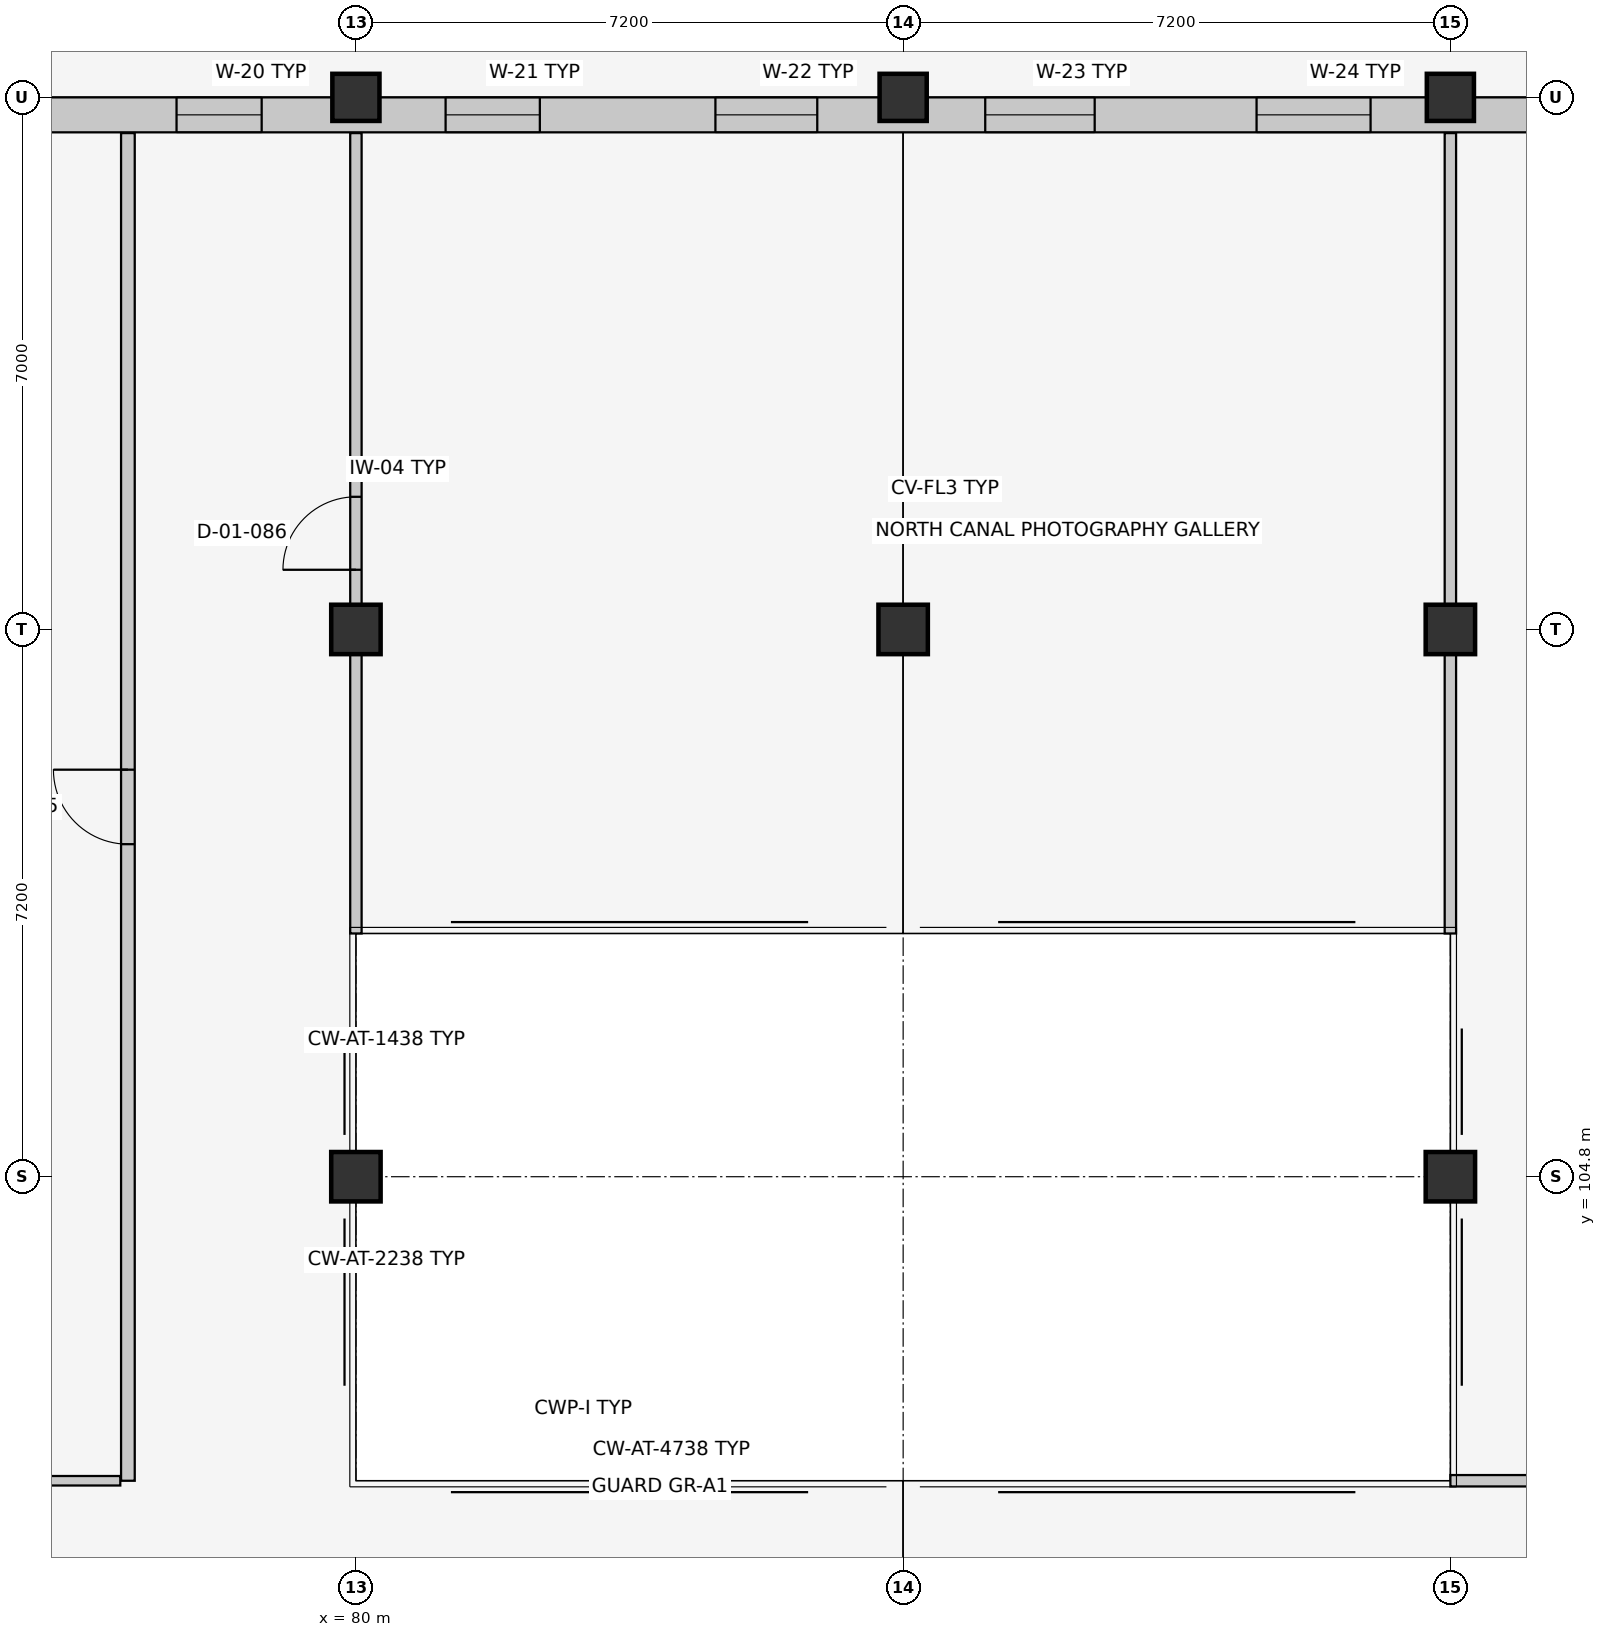
"""IFC4 building model, lengths in metres.
Left out: names, types, materials, properties, quantities, classifications, styles, units other than length and angle.
Written with IfcOpenShell. Run it as: python <this file> out.ifc"""

import sys

from ifc_helpers import new_model, si_unit, direction, frame, frame_2d, origin, origin_2d, place, context, subcontext, project, spatial, rectangle, extrude, element, fill, save


model = new_model("IFC4")
c1 = context("Model", 3, precision=1e-05, world=origin(), true_north=direction((0.0, 1.0)))
c2 = subcontext(c1, "Body", "Model", "MODEL_VIEW")
j1 = project(units=[si_unit("LENGTHUNIT", "METRE"), si_unit("PLANEANGLEUNIT", "RADIAN")], contexts=[c1])
p1 = place(None, origin())
s1 = spatial("IfcSite", under=j1, at=p1, CompositionType="ELEMENT")
p2 = place(p1, origin())
s2 = spatial("IfcBuilding", under=s1, at=p2, CompositionType="ELEMENT")
p3 = place(p2, frame((0.0, 0.0, 5.4)))
s3 = spatial("IfcBuildingStorey", under=s2, at=p3, CompositionType="ELEMENT", Elevation=5.4)
for number, where, z_axis, x_axis in (
    (1, (80.0, 104.8, 0.0), (0.0, 0.0, 1.0), (1.0, 0.0, 0.0)),
    (2, (80.0, 112.0, 0.0), (0.0, 0.0, 1.0), (1.0, 0.0, 0.0)),
):
    element("IfcColumn", number, at=place(p3, frame(where, z_axis=z_axis, x_axis=x_axis)), inside=s3, PredefinedType="COLUMN", context=c2, shape_type="SweptSolid", body=[
        extrude(rectangle(XDim=0.65, YDim=0.65, at=origin_2d()), origin(), (0.0, 0.0, 1.0), 4.2),
    ])
p4 = place(p3, frame((80.0, 119.0, 0.0), z_axis=(0.0, 0.0, 1.0), x_axis=(1.0, 0.0, 0.0)))
e3 = element("IfcColumn", 3, at=p4, inside=s3, PredefinedType="COLUMN", context=c2, shape_type="SweptSolid", body=[
    extrude(rectangle(XDim=0.62, YDim=0.62, at=origin_2d()), origin(), (0.0, 0.0, 1.0), 4.2),
])
p5 = place(p3, frame((87.2, 112.0, 0.0), z_axis=(0.0, 0.0, 1.0), x_axis=(1.0, 0.0, 0.0)))
e4 = element("IfcColumn", 4, at=p5, inside=s3, PredefinedType="COLUMN", context=c2, shape_type="SweptSolid", body=[
    extrude(rectangle(XDim=0.65, YDim=0.65, at=origin_2d()), origin(), (0.0, 0.0, 1.0), 4.2),
])
p6 = place(p3, frame((87.2, 119.0, 0.0), z_axis=(0.0, 0.0, 1.0), x_axis=(1.0, 0.0, 0.0)))
e5 = element("IfcColumn", 5, at=p6, inside=s3, PredefinedType="COLUMN", context=c2, shape_type="SweptSolid", body=[
    extrude(rectangle(XDim=0.62, YDim=0.62, at=origin_2d()), origin(), (0.0, 0.0, 1.0), 4.2),
])
for number, where, z_axis, x_axis in (
    (6, (94.4, 104.8, 0.0), (0.0, 0.0, 1.0), (1.0, 0.0, 0.0)),
    (7, (94.4, 112.0, 0.0), (0.0, 0.0, 1.0), (1.0, 0.0, 0.0)),
):
    element("IfcColumn", number, at=place(p3, frame(where, z_axis=z_axis, x_axis=x_axis)), inside=s3, PredefinedType="COLUMN", context=c2, shape_type="SweptSolid", body=[
        extrude(rectangle(XDim=0.65, YDim=0.65, at=origin_2d()), origin(), (0.0, 0.0, 1.0), 4.2),
    ])
p7 = place(p3, frame((94.4, 119.0, 0.0), z_axis=(0.0, 0.0, 1.0), x_axis=(1.0, 0.0, 0.0)))
e8 = element("IfcColumn", 8, at=p7, inside=s3, PredefinedType="COLUMN", context=c2, shape_type="SweptSolid", body=[
    extrude(rectangle(XDim=0.62, YDim=0.62, at=origin_2d()), origin(), (0.0, 0.0, 1.0), 4.2),
])
p8 = place(p3, frame((65.6, 118.77, 0.0), z_axis=(0.0, 0.0, 1.0), x_axis=(1.0, 0.0, 0.0)))
e9 = element("IfcWall", 9, at=p8, inside=s3, PredefinedType="SOLIDWALL", context=c2, shape_type="SweptSolid", body=[
    extrude(rectangle(XDim=43.2, YDim=0.46, at=frame_2d((21.6, 0.0))), origin(), (0.0, 0.0, 1.0), 3.215),
])
p9 = place(p8, frame((1.11, 0.0, 0.9)))
e10 = element("IfcOpeningElement", 10, at=p9, cuts=e9, PredefinedType="OPENING", context=c2, shape_type="SweptSolid", body=[
    extrude(rectangle(XDim=1.38, YDim=1.6, at=frame_2d((0.69, 0.8))), frame((0.0, 0.242, 0.0), z_axis=(0.0, -1.0, 0.0), x_axis=(1.0, 0.0, 0.0)), (0.0, 0.0, 1.0), 0.484),
])
p10 = place(p8, frame((4.65, 0.0, 0.9)))
e11 = element("IfcOpeningElement", 11, at=p10, cuts=e9, PredefinedType="OPENING", context=c2, shape_type="SweptSolid", body=[
    extrude(rectangle(XDim=1.5, YDim=1.6, at=frame_2d((0.75, 0.8))), frame((0.0, 0.242, 0.0), z_axis=(0.0, -1.0, 0.0), x_axis=(1.0, 0.0, 0.0)), (0.0, 0.0, 1.0), 0.484),
])
p11 = place(p8, frame((8.5, 0.0, 0.9)))
e12 = element("IfcOpeningElement", 12, at=p11, cuts=e9, PredefinedType="OPENING", context=c2, shape_type="SweptSolid", body=[
    extrude(rectangle(XDim=1.0, YDim=1.75, at=frame_2d((0.5, 0.875))), frame((0.0, 0.242, 0.0), z_axis=(0.0, -1.0, 0.0), x_axis=(1.0, 0.0, 0.0)), (0.0, 0.0, 1.0), 0.484),
])
p12 = place(p8, frame((12.04, 0.0, 0.9)))
e13 = element("IfcOpeningElement", 13, at=p12, cuts=e9, PredefinedType="OPENING", context=c2, shape_type="SweptSolid", body=[
    extrude(rectangle(XDim=1.12, YDim=1.75, at=frame_2d((0.56, 0.875))), frame((0.0, 0.242, 0.0), z_axis=(0.0, -1.0, 0.0), x_axis=(1.0, 0.0, 0.0)), (0.0, 0.0, 1.0), 0.484),
])
p13 = place(p8, frame((15.58, 0.0, 0.9)))
e14 = element("IfcOpeningElement", 14, at=p13, cuts=e9, PredefinedType="OPENING", context=c2, shape_type="SweptSolid", body=[
    extrude(rectangle(XDim=1.24, YDim=1.75, at=frame_2d((0.62, 0.875))), frame((0.0, 0.242, 0.0), z_axis=(0.0, -1.0, 0.0), x_axis=(1.0, 0.0, 0.0)), (0.0, 0.0, 1.0), 0.484),
])
p14 = place(p8, frame((19.13, 0.0, 0.9)))
e15 = element("IfcOpeningElement", 15, at=p14, cuts=e9, PredefinedType="OPENING", context=c2, shape_type="SweptSolid", body=[
    extrude(rectangle(XDim=1.34, YDim=1.75, at=frame_2d((0.67, 0.875))), frame((0.0, 0.242, 0.0), z_axis=(0.0, -1.0, 0.0), x_axis=(1.0, 0.0, 0.0)), (0.0, 0.0, 1.0), 0.484),
])
p15 = place(p8, frame((22.68, 0.0, 0.9)))
e16 = element("IfcOpeningElement", 16, at=p15, cuts=e9, PredefinedType="OPENING", context=c2, shape_type="SweptSolid", body=[
    extrude(rectangle(XDim=1.44, YDim=1.75, at=frame_2d((0.72, 0.875))), frame((0.0, 0.242, 0.0), z_axis=(0.0, -1.0, 0.0), x_axis=(1.0, 0.0, 0.0)), (0.0, 0.0, 1.0), 0.484),
])
p16 = place(p8, frame((26.25, 0.0, 0.9)))
e17 = element("IfcOpeningElement", 17, at=p16, cuts=e9, PredefinedType="OPENING", context=c2, shape_type="SweptSolid", body=[
    extrude(rectangle(XDim=1.5, YDim=1.75, at=frame_2d((0.75, 0.875))), frame((0.0, 0.242, 0.0), z_axis=(0.0, -1.0, 0.0), x_axis=(1.0, 0.0, 0.0)), (0.0, 0.0, 1.0), 0.484),
])
p17 = place(p8, frame((30.15, 0.0, 0.9)))
e18 = element("IfcOpeningElement", 18, at=p17, cuts=e9, PredefinedType="OPENING", context=c2, shape_type="SweptSolid", body=[
    extrude(rectangle(XDim=0.9, YDim=1.35, at=frame_2d((0.45, 0.675))), frame((0.0, 0.242, 0.0), z_axis=(0.0, -1.0, 0.0), x_axis=(1.0, 0.0, 0.0)), (0.0, 0.0, 1.0), 0.484),
])
p18 = place(p8, frame((33.7, 0.0, 0.9)))
e19 = element("IfcOpeningElement", 19, at=p18, cuts=e9, PredefinedType="OPENING", context=c2, shape_type="SweptSolid", body=[
    extrude(rectangle(XDim=1.0, YDim=1.35, at=frame_2d((0.5, 0.675))), frame((0.0, 0.242, 0.0), z_axis=(0.0, -1.0, 0.0), x_axis=(1.0, 0.0, 0.0)), (0.0, 0.0, 1.0), 0.484),
])
p19 = place(p8, frame((37.25, 0.0, 0.9)))
e20 = element("IfcOpeningElement", 20, at=p19, cuts=e9, PredefinedType="OPENING", context=c2, shape_type="SweptSolid", body=[
    extrude(rectangle(XDim=1.1, YDim=1.35, at=frame_2d((0.55, 0.675))), frame((0.0, 0.242, 0.0), z_axis=(0.0, -1.0, 0.0), x_axis=(1.0, 0.0, 0.0)), (0.0, 0.0, 1.0), 0.484),
])
p20 = place(p8, frame((40.8, 0.0, 0.9)))
e21 = element("IfcOpeningElement", 21, at=p20, cuts=e9, PredefinedType="OPENING", context=c2, shape_type="SweptSolid", body=[
    extrude(rectangle(XDim=1.2, YDim=1.35, at=frame_2d((0.6, 0.675))), frame((0.0, 0.242, 0.0), z_axis=(0.0, -1.0, 0.0), x_axis=(1.0, 0.0, 0.0)), (0.0, 0.0, 1.0), 0.484),
])
p21 = place(p3, frame((77.0, 100.8, 0.0), z_axis=(0.0, 0.0, 1.0), x_axis=(0.0, 1.0, 0.0)))
e22 = element("IfcWall", 22, at=p21, inside=s3, PredefinedType="PARTITIONING", context=c2, shape_type="SweptSolid", body=[
    extrude(rectangle(XDim=17.73, YDim=0.18, at=frame_2d((8.865, 0.0))), origin(), (0.0, 0.0, 1.0), 3.92),
])
p22 = place(p21, frame((8.375, 0.0, 0.0)))
e23 = element("IfcOpeningElement", 23, at=p22, cuts=e22, PredefinedType="OPENING", context=c2, shape_type="SweptSolid", body=[
    extrude(rectangle(XDim=0.98, YDim=2.12, at=frame_2d((0.49, 1.06))), frame((0.0, 0.102, 0.0), z_axis=(0.0, -1.0, 0.0), x_axis=(1.0, 0.0, 0.0)), (0.0, 0.0, 1.0), 0.204),
])
p23 = place(p3, frame((66.07, 100.8, 0.0), z_axis=(0.0, 0.0, 1.0), x_axis=(1.0, 0.0, 0.0)))
e24 = element("IfcWall", 24, at=p23, inside=s3, PredefinedType="PARTITIONING", context=c2, shape_type="SweptSolid", body=[
    extrude(rectangle(XDim=10.83, YDim=0.125, at=frame_2d((5.415, 0.0))), origin(), (0.0, 0.0, 1.0), 3.92),
])
p24 = place(p3, frame((80.0, 108.0, 0.0), z_axis=(0.0, 0.0, 1.0), x_axis=(0.0, 1.0, 0.0)))
e25 = element("IfcWall", 25, at=p24, inside=s3, PredefinedType="PARTITIONING", context=c2, shape_type="SweptSolid", body=[
    extrude(rectangle(XDim=10.53, YDim=0.15, at=frame_2d((5.265, 0.0))), origin(), (0.0, 0.0, 1.0), 3.295),
])
p25 = place(p24, frame((4.785, 0.0, 0.0)))
e26 = element("IfcOpeningElement", 26, at=p25, cuts=e25, PredefinedType="OPENING", context=c2, shape_type="SweptSolid", body=[
    extrude(rectangle(XDim=0.96, YDim=2.1, at=frame_2d((0.48, 1.05))), frame((0.0, 0.087, 0.0), z_axis=(0.0, -1.0, 0.0), x_axis=(1.0, 0.0, 0.0)), (0.0, 0.0, 1.0), 0.174),
])
p26 = place(p3, frame((94.4, 108.0, 0.0), z_axis=(0.0, 0.0, 1.0), x_axis=(0.0, 1.0, 0.0)))
e27 = element("IfcWall", 27, at=p26, inside=s3, PredefinedType="PARTITIONING", context=c2, shape_type="SweptSolid", body=[
    extrude(rectangle(XDim=10.53, YDim=0.15, at=frame_2d((5.265, 0.0))), origin(), (0.0, 0.0, 1.0), 3.295),
])
p27 = place(p3, frame((94.4, 100.8, 0.0), z_axis=(0.0, 0.0, 1.0), x_axis=(1.0, 0.0, 0.0)))
e28 = element("IfcWall", 28, at=p27, inside=s3, PredefinedType="PARTITIONING", context=c2, shape_type="SweptSolid", body=[
    extrude(rectangle(XDim=13.93, YDim=0.15, at=frame_2d((6.965, 0.0))), origin(), (0.0, 0.0, 1.0), 3.92),
])
p28 = place(p27, frame((6.495, 0.0, 0.0)))
e29 = element("IfcOpeningElement", 29, at=p28, cuts=e28, PredefinedType="OPENING", context=c2, shape_type="SweptSolid", body=[
    extrude(rectangle(XDim=0.94, YDim=2.1, at=frame_2d((0.47, 1.05))), frame((0.0, 0.087, 0.0), z_axis=(0.0, -1.0, 0.0), x_axis=(1.0, 0.0, 0.0)), (0.0, 0.0, 1.0), 0.174),
])
p29 = place(p12, origin())
e30 = element("IfcWindow", 30, at=p29, inside=s3, PartitioningType="SINGLE_PANEL", PredefinedType="WINDOW", context=c2, shape_type="SweptSolid", body=[
    extrude(rectangle(XDim=1.12, YDim=1.75, at=frame_2d((0.56, 0.875))), frame((0.0, 0.03, 0.0), z_axis=(0.0, -1.0, 0.0), x_axis=(1.0, 0.0, 0.0)), (0.0, 0.0, 1.0), 0.06),
])
fill(e13, e30)
p30 = place(p13, origin())
e31 = element("IfcWindow", 31, at=p30, inside=s3, PartitioningType="SINGLE_PANEL", PredefinedType="WINDOW", context=c2, shape_type="SweptSolid", body=[
    extrude(rectangle(XDim=1.24, YDim=1.75, at=frame_2d((0.62, 0.875))), frame((0.0, 0.03, 0.0), z_axis=(0.0, -1.0, 0.0), x_axis=(1.0, 0.0, 0.0)), (0.0, 0.0, 1.0), 0.06),
])
fill(e14, e31)
p31 = place(p14, origin())
e32 = element("IfcWindow", 32, at=p31, inside=s3, PartitioningType="SINGLE_PANEL", PredefinedType="WINDOW", context=c2, shape_type="SweptSolid", body=[
    extrude(rectangle(XDim=1.34, YDim=1.75, at=frame_2d((0.67, 0.875))), frame((0.0, 0.03, 0.0), z_axis=(0.0, -1.0, 0.0), x_axis=(1.0, 0.0, 0.0)), (0.0, 0.0, 1.0), 0.06),
])
fill(e15, e32)
p32 = place(p15, origin())
e33 = element("IfcWindow", 33, at=p32, inside=s3, PartitioningType="SINGLE_PANEL", PredefinedType="WINDOW", context=c2, shape_type="SweptSolid", body=[
    extrude(rectangle(XDim=1.44, YDim=1.75, at=frame_2d((0.72, 0.875))), frame((0.0, 0.03, 0.0), z_axis=(0.0, -1.0, 0.0), x_axis=(1.0, 0.0, 0.0)), (0.0, 0.0, 1.0), 0.06),
])
fill(e16, e33)
p33 = place(p16, origin())
e34 = element("IfcWindow", 34, at=p33, inside=s3, PartitioningType="SINGLE_PANEL", PredefinedType="WINDOW", context=c2, shape_type="SweptSolid", body=[
    extrude(rectangle(XDim=1.5, YDim=1.75, at=frame_2d((0.75, 0.875))), frame((0.0, 0.03, 0.0), z_axis=(0.0, -1.0, 0.0), x_axis=(1.0, 0.0, 0.0)), (0.0, 0.0, 1.0), 0.06),
])
fill(e17, e34)
p34 = place(p22, origin())
e35 = element("IfcDoor", 35, at=p34, inside=s3, OperationType="SINGLE_SWING_RIGHT", PredefinedType="DOOR", context=c2, shape_type="SweptSolid", body=[
    extrude(rectangle(XDim=0.98, YDim=2.12, at=frame_2d((0.49, 1.06))), frame((0.0, 0.025, 0.0), z_axis=(0.0, -1.0, 0.0), x_axis=(1.0, 0.0, 0.0)), (0.0, 0.0, 1.0), 0.05),
])
fill(e23, e35)
p35 = place(p25, origin())
e36 = element("IfcDoor", 36, at=p35, inside=s3, OperationType="SINGLE_SWING_LEFT", PredefinedType="DOOR", context=c2, shape_type="SweptSolid", body=[
    extrude(rectangle(XDim=0.96, YDim=2.1, at=frame_2d((0.48, 1.05))), frame((0.0, 0.025, 0.0), z_axis=(0.0, -1.0, 0.0), x_axis=(1.0, 0.0, 0.0)), (0.0, 0.0, 1.0), 0.05),
])
fill(e26, e36)
save(model, sys.argv[1])
